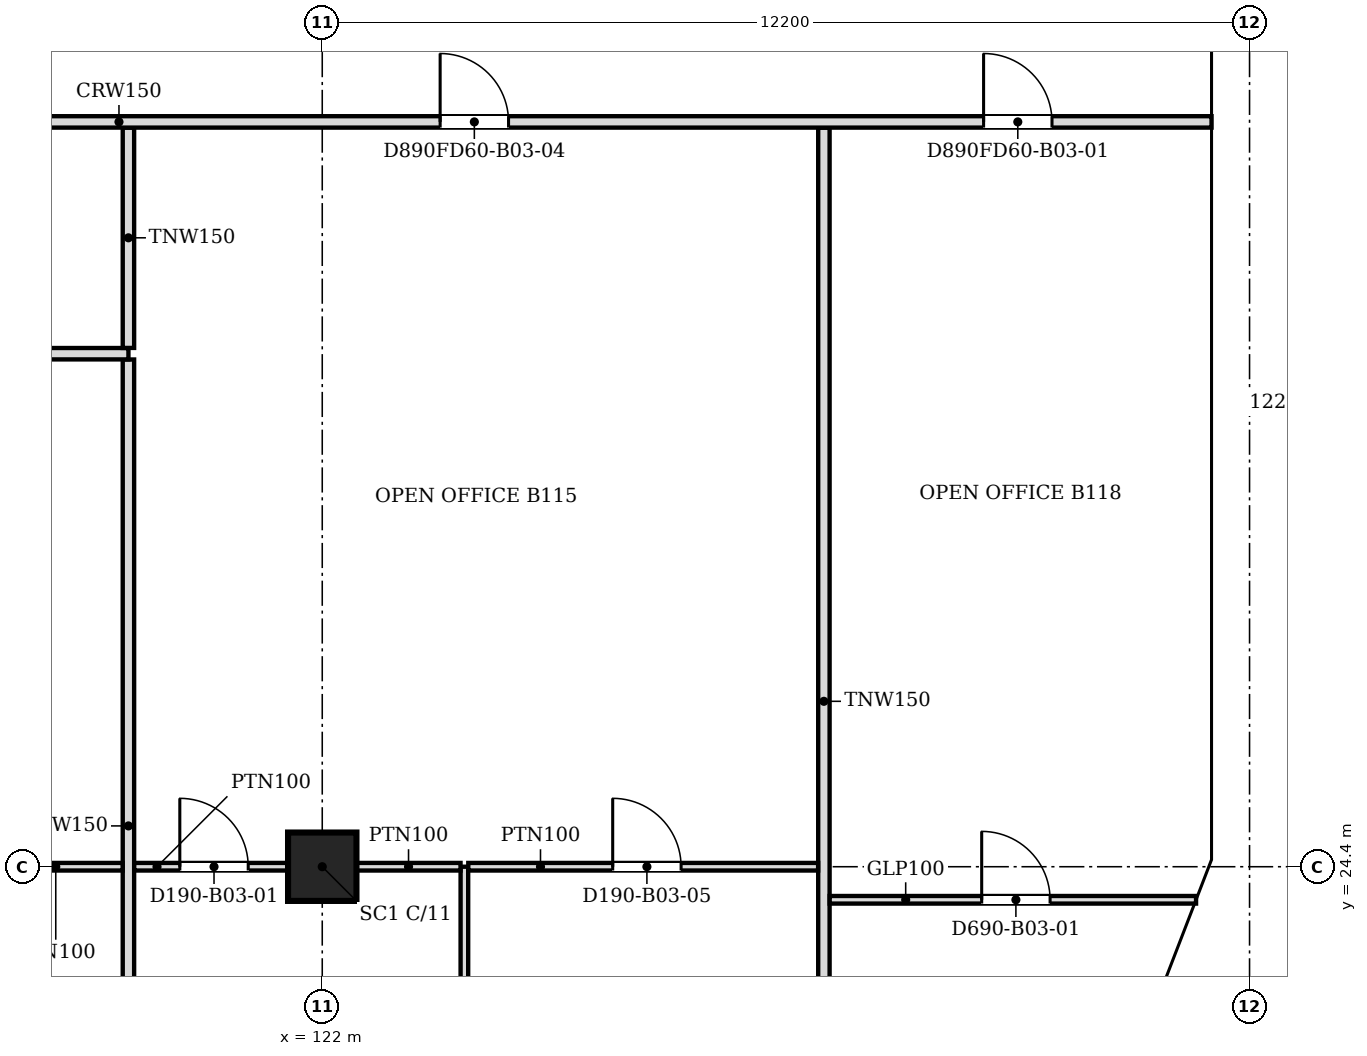
"""IFC4 building model, lengths in metres.
Left out: names, types, materials, properties, quantities, classifications, styles, units other than length and angle.
Written with IfcOpenShell. Run it as: python <this file> out.ifc"""

import sys

from ifc_helpers import new_model, si_unit, direction, frame, frame_2d, origin, origin_2d, place, context, subcontext, project, spatial, polyline, rectangle, outline, extrude, faceted_brep, source, transform, mapped, element, fill, save


model = new_model("IFC4")
c1 = context("Model", 3, precision=1e-05, world=origin(), true_north=direction((0.0, 1.0)))
c2 = subcontext(c1, "Body", "Model", "MODEL_VIEW")
j1 = project(units=[si_unit("LENGTHUNIT", "METRE"), si_unit("PLANEANGLEUNIT", "RADIAN")], contexts=[c1])
p1 = place(None, origin())
s1 = spatial("IfcSite", under=j1, at=p1, CompositionType="ELEMENT")
p2 = place(p1, origin())
s2 = spatial("IfcBuilding", under=s1, at=p2, CompositionType="ELEMENT")
p3 = place(p2, frame((0.0, 0.0, 33.4)))
s3 = spatial("IfcBuildingStorey", under=s2, at=p3, CompositionType="ELEMENT", Elevation=33.4)
p4 = place(p3, frame((122.0, 24.4, 0.0), z_axis=(0.0, 0.0, 1.0), x_axis=(1.0, 0.0, 0.0)))
e1 = element("IfcColumn", 1, at=p4, inside=s3, PredefinedType="COLUMN", context=c2, shape_type="SweptSolid", body=[
    extrude(rectangle(XDim=0.9, YDim=0.9, at=origin_2d()), origin(), (0.0, 0.0, 1.0), 3.6),
])
m1 = source(origin(), c2, "Body", "Brep", [
    faceted_brep([(0.053, -0.25, 0.0), (3.003, -0.25, 3.8), (0.053, -0.25, 7.6), (0.0, -0.25, 7.531), (0.0, -0.25, 0.068), (0.106, 0.25, 7.532), (2.957, 0.25, 3.86), (2.957, 0.25, 3.74), (0.106, 0.25, 0.068), (3.003, 0.0, 3.8), (0.053, 0.0, 0.0), (0.053, 0.0, 7.6)], [[[0, 1, 2, 3, 4]], [[5, 6, 7, 8]], [[8, 7, 9, 1, 0, 10]], [[6, 5, 11, 2, 1, 9]], [[3, 2, 11]], [[10, 0, 4]], [[8, 10, 4, 3, 11, 5]], [[9, 7, 6]]]),
])
p5 = place(p3, frame((132.869, 21.644, -3.8), z_axis=(0.0, 0.0, 1.0), x_axis=(0.359855894603, 0.933007896601, 0.0)))
e2 = element("IfcWall", 2, at=p5, inside=s3, PredefinedType="SOLIDWALL", context=c2, shape_type="MappedRepresentation", body=[
    mapped(m1, transform((0.0, 0.0, 0.0), scale=1.0)),
])
m2 = source(origin(), c2, "Body", "SweptSolid", [
    extrude(outline(polyline([(0.253, 0.665), (2.687, 3.8), (0.253, 6.935), (0.253, 0.665)])), frame((0.0, 0.26, 0.0), z_axis=(0.0, -1.0, 0.0), x_axis=(1.0, 0.0, 0.0)), (0.0, 0.0, 1.0), 0.52),
])
p6 = place(p5, origin())
e3 = element("IfcOpeningElement", 3, at=p6, cuts=e2, PredefinedType="OPENING", context=c2, shape_type="MappedRepresentation", body=[
    mapped(m2, transform((0.0, 0.0, 0.0), scale=1.0)),
])
m3 = source(origin(), c2, "Body", "Brep", [
    faceted_brep([(3.003, -0.25, 0.0), (6.053, -0.25, 3.8), (3.003, -0.25, 7.6), (0.0, -0.25, 3.8), (0.047, 0.25, 3.859), (3.003, 0.25, 7.6), (6.053, 0.25, 3.8), (3.003, 0.25, 0.0), (0.047, 0.25, 3.741), (0.0, 0.0, 3.8)], [[[0, 1, 2, 3]], [[4, 5, 6, 7, 8]], [[7, 6, 1, 0]], [[6, 5, 2, 1]], [[5, 4, 9, 3, 2]], [[8, 7, 0, 3, 9]], [[8, 9, 4]]]),
])
p7 = place(p3, frame((133.95, 24.447, -3.8), z_axis=(0.0, 0.0, 1.0), x_axis=(0.0, 1.0, 0.0)))
e4 = element("IfcWall", 4, at=p7, inside=s3, PredefinedType="SOLIDWALL", context=c2, shape_type="MappedRepresentation", body=[
    mapped(m3, transform((0.0, 0.0, 0.0), scale=1.0)),
])
m4 = source(origin(), c2, "Body", "SweptSolid", [
    extrude(outline(polyline([(3.005, 0.401), (5.733, 3.8), (3.005, 7.199), (0.319, 3.8), (3.005, 0.401)])), frame((0.0, 0.26, 0.0), z_axis=(0.0, -1.0, 0.0), x_axis=(1.0, 0.0, 0.0)), (0.0, 0.0, 1.0), 0.52),
])
p8 = place(p7, origin())
e5 = element("IfcOpeningElement", 5, at=p8, cuts=e4, PredefinedType="OPENING", context=c2, shape_type="MappedRepresentation", body=[
    mapped(m4, transform((0.0, 0.0, 0.0), scale=1.0)),
])
m5 = source(origin(), c2, "Body", "SweptSolid", [
    extrude(outline(polyline([(3.05, 0.0), (6.1, 3.8), (3.05, 7.6), (0.0, 3.8), (3.05, 0.0)])), frame((0.0, 0.25, 0.0), z_axis=(0.0, -1.0, 0.0), x_axis=(1.0, 0.0, 0.0)), (0.0, 0.0, 1.0), 0.5),
])
p9 = place(p3, frame((133.95, 30.5, -3.8), z_axis=(0.0, 0.0, 1.0), x_axis=(0.0, 1.0, 0.0)))
e6 = element("IfcWall", 6, at=p9, inside=s3, PredefinedType="SOLIDWALL", context=c2, shape_type="MappedRepresentation", body=[
    mapped(m5, transform((0.0, 0.0, 0.0), scale=1.0)),
])
m6 = source(origin(), c2, "Body", "SweptSolid", [
    extrude(outline(polyline([(3.05, 0.399), (5.78, 3.8), (3.05, 7.2), (0.321, 3.8), (3.05, 0.399)])), frame((0.0, 0.26, 0.0), z_axis=(0.0, -1.0, 0.0), x_axis=(1.0, 0.0, 0.0)), (0.0, 0.0, 1.0), 0.52),
])
p10 = place(p9, origin())
e7 = element("IfcOpeningElement", 7, at=p10, cuts=e6, PredefinedType="OPENING", context=c2, shape_type="MappedRepresentation", body=[
    mapped(m6, transform((0.0, 0.0, 0.0), scale=1.0)),
])
p11 = place(p2, frame((0.0, 0.0, 37.2)))
s4 = spatial("IfcBuildingStorey", under=s2, at=p11, CompositionType="ELEMENT", Elevation=37.2)
m7 = source(origin(), c2, "Body", "Brep", [
    faceted_brep([(2.95, -0.25, 0.0), (2.997, -0.25, 0.059), (2.997, -0.25, 7.541), (2.95, -0.25, 7.6), (0.0, -0.25, 3.8), (0.053, 0.25, 3.868), (2.904, 0.25, 7.54), (2.904, 0.25, 0.06), (0.053, 0.25, 3.732), (2.95, 0.0, 0.0), (2.95, 0.0, 7.6), (0.0, 0.0, 3.8)], [[[0, 1, 2, 3, 4]], [[5, 6, 7, 8]], [[1, 0, 9]], [[10, 3, 2]], [[6, 5, 11, 4, 3, 10]], [[8, 7, 9, 0, 4, 11]], [[8, 11, 5]], [[1, 9, 7, 6, 10, 2]]]),
])
p12 = place(p11, frame((132.888, 21.694, -3.8), z_axis=(0.0, 0.0, 1.0), x_axis=(0.359901446078, 0.932990326376, 0.0)))
e8 = element("IfcWall", 8, at=p12, inside=s4, PredefinedType="SOLIDWALL", context=c2, shape_type="MappedRepresentation", body=[
    mapped(m7, transform((0.0, 0.0, 0.0), scale=1.0)),
])
m8 = source(origin(), c2, "Body", "SweptSolid", [
    extrude(outline(polyline([(2.75, 6.935), (0.316, 3.8), (2.75, 0.665), (2.75, 6.935)])), frame((0.0, 0.26, 0.0), z_axis=(0.0, -1.0, 0.0), x_axis=(1.0, 0.0, 0.0)), (0.0, 0.0, 1.0), 0.52),
])
p13 = place(p12, origin())
e9 = element("IfcOpeningElement", 9, at=p13, cuts=e8, PredefinedType="OPENING", context=c2, shape_type="MappedRepresentation", body=[
    mapped(m8, transform((0.0, 0.0, 0.0), scale=1.0)),
])
m9 = source(origin(), c2, "Body", "Brep", [
    faceted_brep([(0.047, -0.25, 0.0), (3.05, -0.25, 3.8), (0.047, -0.25, 7.6), (0.0, -0.25, 7.54), (0.0, -0.25, 0.06), (0.093, 0.25, 7.541), (3.05, 0.25, 3.8), (0.093, 0.25, 0.059), (0.047, 0.0, 0.0), (0.047, 0.0, 7.6)], [[[0, 1, 2, 3, 4]], [[5, 6, 7]], [[7, 6, 1, 0, 8]], [[6, 5, 9, 2, 1]], [[3, 2, 9]], [[8, 0, 4]], [[7, 8, 4, 3, 9, 5]]]),
])
p14 = place(p11, frame((133.95, 24.4, -3.8), z_axis=(0.0, 0.0, 1.0), x_axis=(0.0, 1.0, 0.0)))
e10 = element("IfcWall", 10, at=p14, inside=s4, PredefinedType="SOLIDWALL", context=c2, shape_type="MappedRepresentation", body=[
    mapped(m9, transform((0.0, 0.0, 0.0), scale=1.0)),
])
m10 = source(origin(), c2, "Body", "SweptSolid", [
    extrude(outline(polyline([(0.247, 0.656), (2.731, 3.8), (0.247, 6.944), (0.247, 0.656)])), frame((0.0, 0.26, 0.0), z_axis=(0.0, -1.0, 0.0), x_axis=(1.0, 0.0, 0.0)), (0.0, 0.0, 1.0), 0.52),
])
p15 = place(p14, origin())
e11 = element("IfcOpeningElement", 11, at=p15, cuts=e10, PredefinedType="OPENING", context=c2, shape_type="MappedRepresentation", body=[
    mapped(m10, transform((0.0, 0.0, 0.0), scale=1.0)),
])
m11 = source(origin(), c2, "Body", "SweptSolid", [
    extrude(outline(polyline([(3.05, 0.0), (6.1, 3.8), (3.05, 7.6), (0.0, 3.8), (3.05, 0.0)])), frame((0.0, 0.25, 0.0), z_axis=(0.0, -1.0, 0.0), x_axis=(1.0, 0.0, 0.0)), (0.0, 0.0, 1.0), 0.5),
])
p16 = place(p11, frame((133.95, 27.45, -3.8), z_axis=(0.0, 0.0, 1.0), x_axis=(0.0, 1.0, 0.0)))
e12 = element("IfcWall", 12, at=p16, inside=s4, PredefinedType="SOLIDWALL", context=c2, shape_type="MappedRepresentation", body=[
    mapped(m11, transform((0.0, 0.0, 0.0), scale=1.0)),
])
m12 = source(origin(), c2, "Body", "SweptSolid", [
    extrude(outline(polyline([(3.05, 0.399), (5.78, 3.8), (3.05, 7.201), (0.321, 3.8), (3.05, 0.399)])), frame((0.0, 0.26, 0.0), z_axis=(0.0, -1.0, 0.0), x_axis=(1.0, 0.0, 0.0)), (0.0, 0.0, 1.0), 0.52),
])
p17 = place(p16, origin())
e13 = element("IfcOpeningElement", 13, at=p17, cuts=e12, PredefinedType="OPENING", context=c2, shape_type="MappedRepresentation", body=[
    mapped(m12, transform((0.0, 0.0, 0.0), scale=1.0)),
])
m13 = source(origin(), c2, "Body", "Brep", [
    faceted_brep([(3.05, -0.25, 0.0), (6.1, -0.25, 3.8), (6.1, -0.25, 3.8), (3.05, -0.25, 7.6), (0.0, -0.25, 3.8), (0.0, 0.25, 3.8), (3.05, 0.25, 7.6), (6.1, 0.25, 3.8), (6.1, 0.25, 3.8), (3.05, 0.25, 0.0)], [[[0, 1, 2, 3, 4]], [[5, 6, 7, 8, 9]], [[9, 8, 1, 0]], [[7, 6, 3, 2]], [[6, 5, 4, 3]], [[5, 9, 0, 4]], [[1, 8, 7, 2]]]),
])
p18 = place(p11, frame((133.95, 33.55, -3.8), z_axis=(0.0, 0.0, 1.0), x_axis=(0.0, 1.0, 0.0)))
e14 = element("IfcWall", 14, at=p18, inside=s4, PredefinedType="SOLIDWALL", context=c2, shape_type="MappedRepresentation", body=[
    mapped(m13, transform((0.0, 0.0, 0.0), scale=1.0)),
])
p19 = place(p18, origin())
e15 = element("IfcOpeningElement", 15, at=p19, cuts=e14, PredefinedType="OPENING", context=c2, shape_type="MappedRepresentation", body=[
    mapped(m12, transform((0.0, 0.0, 0.0), scale=1.0)),
])
p20 = place(p3, frame((119.45, 18.8, 0.0), z_axis=(0.0, 0.0, 1.0), x_axis=(0.0, 1.0, 0.0)))
e16 = element("IfcWall", 16, at=p20, inside=s3, PredefinedType="PARTITIONING", context=c2, shape_type="SweptSolid", body=[
    extrude(rectangle(XDim=12.274, YDim=0.15, at=frame_2d((6.137, 0.0))), origin(), (0.0, 0.0, 1.0), 3.067),
])
p21 = place(p3, frame((123.87, 18.8, 0.0), z_axis=(0.0, 0.0, 1.0), x_axis=(0.0, 1.0, 0.0)))
e17 = element("IfcWall", 17, at=p21, inside=s3, PredefinedType="PARTITIONING", context=c2, shape_type="SweptSolid", body=[
    extrude(rectangle(XDim=5.6, YDim=0.1, at=frame_2d((2.8, 0.0))), origin(), (0.0, 0.0, 1.0), 3.067),
])
p22 = place(p3, frame((128.6, 19.029, 0.0), z_axis=(0.0, 0.0, 1.0), x_axis=(0.0, 1.0, 0.0)))
e18 = element("IfcWall", 18, at=p22, inside=s3, PredefinedType="PARTITIONING", context=c2, shape_type="SweptSolid", body=[
    extrude(rectangle(XDim=15.095, YDim=0.15, at=frame_2d((7.548, 0.0))), origin(), (0.0, 0.0, 1.0), 3.067),
])
p23 = place(p3, frame((133.496, 23.965, 0.0), z_axis=(0.0, 0.0, 1.0), x_axis=(-1.0, 0.0, 0.0)))
e19 = element("IfcWall", 19, at=p23, inside=s3, PredefinedType="PARTITIONING", context=c2, shape_type="SweptSolid", body=[
    extrude(rectangle(XDim=4.82, YDim=0.1, at=frame_2d((2.41, 0.0))), origin(), (0.0, 0.0, 1.0), 3.067),
])
m14 = source(origin(), c2, "Body", "SweptSolid", [
    extrude(rectangle(XDim=0.9, YDim=2.1, at=frame_2d((0.45, 1.05))), frame((0.0, 0.06, 0.0), z_axis=(0.0, -1.0, 0.0), x_axis=(1.0, 0.0, 0.0)), (0.0, 0.0, 1.0), 0.12),
])
p24 = place(p23, frame((1.92, 0.0, 0.0)))
e20 = element("IfcOpeningElement", 20, at=p24, cuts=e19, PredefinedType="OPENING", context=c2, shape_type="MappedRepresentation", body=[
    mapped(m14, transform((0.0, 0.0, 0.0), scale=1.0)),
])
p25 = place(p3, frame((119.374, 24.4, 0.0), z_axis=(0.0, 0.0, 1.0), x_axis=(-1.0, 0.0, 0.0)))
e21 = element("IfcWall", 21, at=p25, inside=s3, PredefinedType="PARTITIONING", context=c2, shape_type="SweptSolid", body=[
    extrude(rectangle(XDim=4.36, YDim=0.1, at=frame_2d((2.18, 0.0))), origin(), (0.0, 0.0, 1.0), 3.067),
])
p26 = place(p25, frame((1.76, 0.0, 0.0)))
e22 = element("IfcOpeningElement", 22, at=p26, cuts=e21, PredefinedType="OPENING", context=c2, shape_type="MappedRepresentation", body=[
    mapped(m14, transform((0.0, 0.0, 0.0), scale=1.0)),
])
p27 = place(p3, frame((121.549, 24.4, 0.0), z_axis=(0.0, 0.0, 1.0), x_axis=(-1.0, 0.0, 0.0)))
e23 = element("IfcWall", 23, at=p27, inside=s3, PredefinedType="PARTITIONING", context=c2, shape_type="SweptSolid", body=[
    extrude(rectangle(XDim=2.023, YDim=0.1, at=frame_2d((1.012, 0.0))), origin(), (0.0, 0.0, 1.0), 3.067),
])
p28 = place(p27, frame((0.523, 0.0, 0.0)))
e24 = element("IfcOpeningElement", 24, at=p28, cuts=e23, PredefinedType="OPENING", context=c2, shape_type="MappedRepresentation", body=[
    mapped(m14, transform((0.0, 0.0, 0.0), scale=1.0)),
])
p29 = place(p3, frame((122.451, 24.4, 0.0), z_axis=(0.0, 0.0, 1.0), x_axis=(1.0, 0.0, 0.0)))
e25 = element("IfcWall", 25, at=p29, inside=s3, PredefinedType="PARTITIONING", context=c2, shape_type="SweptSolid", body=[
    extrude(rectangle(XDim=1.368, YDim=0.1, at=frame_2d((0.684, 0.0))), origin(), (0.0, 0.0, 1.0), 3.067),
])
p30 = place(p3, frame((128.524, 24.4, 0.0), z_axis=(0.0, 0.0, 1.0), x_axis=(-1.0, 0.0, 0.0)))
e26 = element("IfcWall", 26, at=p30, inside=s3, PredefinedType="PARTITIONING", context=c2, shape_type="SweptSolid", body=[
    extrude(rectangle(XDim=4.603, YDim=0.1, at=frame_2d((2.301, 0.0))), origin(), (0.0, 0.0, 1.0), 3.067),
])
p31 = place(p30, frame((1.803, 0.0, 0.0)))
e27 = element("IfcOpeningElement", 27, at=p31, cuts=e26, PredefinedType="OPENING", context=c2, shape_type="MappedRepresentation", body=[
    mapped(m14, transform((0.0, 0.0, 0.0), scale=1.0)),
])
p32 = place(p3, frame((119.45, 31.15, 0.0), z_axis=(0.0, 0.0, 1.0), x_axis=(-1.0, 0.0, 0.0)))
e28 = element("IfcWall", 28, at=p32, inside=s3, PredefinedType="PARTITIONING", context=c2, shape_type="SweptSolid", body=[
    extrude(rectangle(XDim=9.65, YDim=0.15, at=frame_2d((4.825, 0.0))), origin(), (0.0, 0.0, 1.0), 3.067),
])
m15 = source(origin(), c2, "Body", "SweptSolid", [
    extrude(rectangle(XDim=0.9, YDim=2.1, at=frame_2d((0.45, 1.05))), frame((0.0, 0.085, 0.0), z_axis=(0.0, -1.0, 0.0), x_axis=(1.0, 0.0, 0.0)), (0.0, 0.0, 1.0), 0.17),
])
p33 = place(p32, frame((4.35, 0.0, 0.0)))
e29 = element("IfcOpeningElement", 29, at=p33, cuts=e28, PredefinedType="OPENING", context=c2, shape_type="MappedRepresentation", body=[
    mapped(m15, transform((0.0, 0.0, 0.0), scale=1.0)),
])
p34 = place(p3, frame((119.45, 31.226, 0.0), z_axis=(0.0, 0.0, 1.0), x_axis=(0.0, 1.0, 0.0)))
e30 = element("IfcWall", 30, at=p34, inside=s3, PredefinedType="PARTITIONING", context=c2, shape_type="SweptSolid", body=[
    extrude(rectangle(XDim=2.898, YDim=0.15, at=frame_2d((1.449, 0.0))), origin(), (0.0, 0.0, 1.0), 3.067),
])
p35 = place(p3, frame((133.7, 34.2, 0.0), z_axis=(0.0, 0.0, 1.0), x_axis=(-1.0, 0.0, 0.0)))
e31 = element("IfcWall", 31, at=p35, inside=s3, PredefinedType="PARTITIONING", context=c2, shape_type="SweptSolid", body=[
    extrude(rectangle(XDim=47.8, YDim=0.15, at=frame_2d((23.9, 0.0))), origin(), (0.0, 0.0, 1.0), 3.067),
])
p36 = place(p35, frame((2.099, 0.0, 0.0)))
e32 = element("IfcOpeningElement", 32, at=p36, cuts=e31, PredefinedType="OPENING", context=c2, shape_type="MappedRepresentation", body=[
    mapped(m15, transform((0.0, 0.0, 0.0), scale=1.0)),
])
m16 = source(origin(), c2, "Body", "SweptSolid", [
    extrude(rectangle(XDim=1.0, YDim=2.1, at=frame_2d((0.5, 1.05))), frame((0.0, 0.085, 0.0), z_axis=(0.0, -1.0, 0.0), x_axis=(1.0, 0.0, 0.0)), (0.0, 0.0, 1.0), 0.17),
])
p37 = place(p35, frame((26.199, 0.0, 0.0)))
e33 = element("IfcOpeningElement", 33, at=p37, cuts=e31, PredefinedType="OPENING", context=c2, shape_type="MappedRepresentation", body=[
    mapped(m16, transform((0.0, 0.0, 0.0), scale=1.0)),
])
p38 = place(p35, frame((44.3, 0.0, 0.0)))
e34 = element("IfcOpeningElement", 34, at=p38, cuts=e31, PredefinedType="OPENING", context=c2, shape_type="MappedRepresentation", body=[
    mapped(m15, transform((0.0, 0.0, 0.0), scale=1.0)),
])
p39 = place(p35, frame((9.249, 0.0, 0.0)))
e35 = element("IfcOpeningElement", 35, at=p39, cuts=e31, PredefinedType="OPENING", context=c2, shape_type="MappedRepresentation", body=[
    mapped(m15, transform((0.0, 0.0, 0.0), scale=1.0)),
])
p40 = place(p35, frame((18.6, 0.0, 0.0)))
e36 = element("IfcOpeningElement", 36, at=p40, cuts=e31, PredefinedType="OPENING", context=c2, shape_type="MappedRepresentation", body=[
    mapped(m16, transform((0.0, 0.0, 0.0), scale=1.0)),
])
p41 = place(p35, frame((35.1, 0.0, 0.0)))
e37 = element("IfcOpeningElement", 37, at=p41, cuts=e31, PredefinedType="OPENING", context=c2, shape_type="MappedRepresentation", body=[
    mapped(m16, transform((0.0, 0.0, 0.0), scale=1.0)),
])
m17 = source(origin(), c2, "Body", "SweptSolid", [
    extrude(rectangle(XDim=0.9, YDim=2.1, at=frame_2d((0.45, 1.05))), frame((0.0, 0.025, 0.0), z_axis=(0.0, -1.0, 0.0), x_axis=(1.0, 0.0, 0.0)), (0.0, 0.0, 1.0), 0.05),
])
p42 = place(p28, origin())
e38 = element("IfcDoor", 38, at=p42, inside=s3, OperationType="SINGLE_SWING_RIGHT", PredefinedType="DOOR", context=c2, shape_type="MappedRepresentation", body=[
    mapped(m17, transform((0.0, 0.0, 0.0), scale=1.0)),
])
fill(e24, e38)
p43 = place(p31, origin())
e39 = element("IfcDoor", 39, at=p43, inside=s3, OperationType="SINGLE_SWING_RIGHT", PredefinedType="DOOR", context=c2, shape_type="MappedRepresentation", body=[
    mapped(m17, transform((0.0, 0.0, 0.0), scale=1.0)),
])
fill(e27, e39)
p44 = place(p24, origin())
e40 = element("IfcDoor", 40, at=p44, inside=s3, OperationType="SINGLE_SWING_RIGHT", PredefinedType="DOOR", context=c2, shape_type="MappedRepresentation", body=[
    mapped(m17, transform((0.0, 0.0, 0.0), scale=1.0)),
])
fill(e20, e40)
p45 = place(p36, origin())
e41 = element("IfcDoor", 41, at=p45, inside=s3, OperationType="SINGLE_SWING_RIGHT", PredefinedType="DOOR", context=c2, shape_type="MappedRepresentation", body=[
    mapped(m17, transform((0.0, 0.0, 0.0), scale=1.0)),
])
fill(e32, e41)
p46 = place(p39, origin())
e42 = element("IfcDoor", 42, at=p46, inside=s3, OperationType="SINGLE_SWING_RIGHT", PredefinedType="DOOR", context=c2, shape_type="MappedRepresentation", body=[
    mapped(m17, transform((0.0, 0.0, 0.0), scale=1.0)),
])
fill(e35, e42)
save(model, sys.argv[1])
